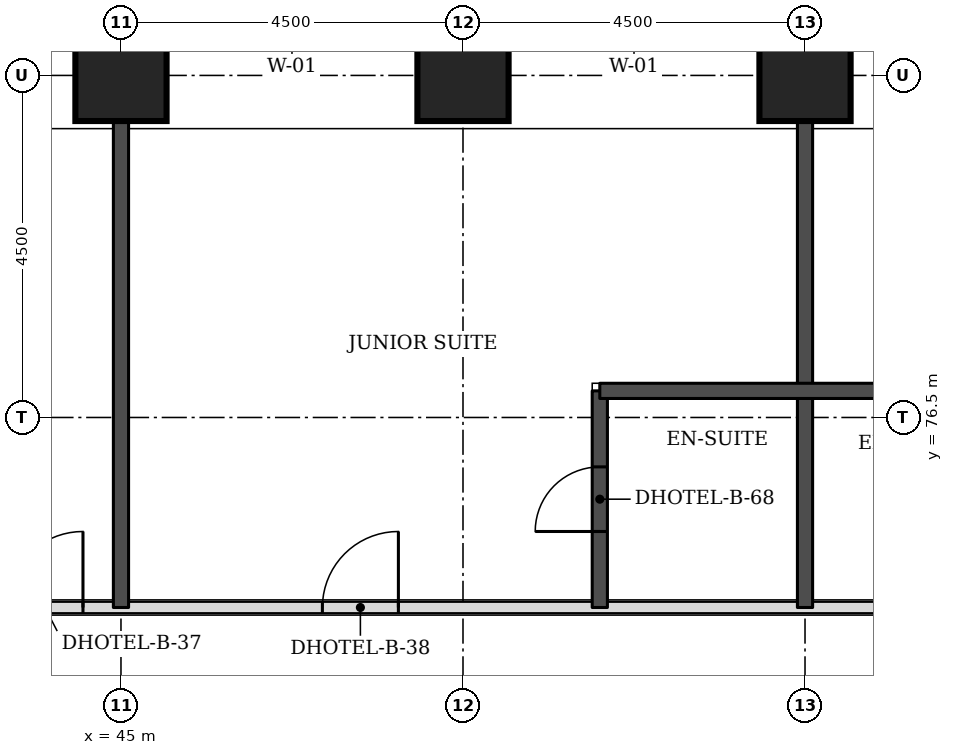
"""IFC4 building model, lengths in metres.
Left out: names, types, materials, properties, quantities, classifications, styles, units other than length and angle.
Written with IfcOpenShell. Run it as: python <this file> out.ifc"""

import sys

from ifc_helpers import new_model, si_unit, direction, frame, frame_2d, origin, origin_2d, place, context, subcontext, project, spatial, rectangle, extrude, element, fill, save


model = new_model("IFC4")
c1 = context("Model", 3, precision=1e-05, world=origin(), true_north=direction((0.0, 1.0)))
c2 = subcontext(c1, "Body", "Model", "MODEL_VIEW")
j1 = project(units=[si_unit("LENGTHUNIT", "METRE"), si_unit("PLANEANGLEUNIT", "RADIAN")], contexts=[c1])
p1 = place(None, origin())
s1 = spatial("IfcSite", under=j1, at=p1, CompositionType="ELEMENT")
p2 = place(p1, origin())
s2 = spatial("IfcBuilding", under=s1, at=p2, CompositionType="ELEMENT")
p3 = place(p2, frame((0.0, 0.0, 52.8)))
s3 = spatial("IfcBuildingStorey", under=s2, at=p3, CompositionType="ELEMENT", Elevation=52.8)
for number, where, z_axis, x_axis in (
    (1, (45.0, 81.0, 0.0), (0.0, 0.0, 1.0), (1.0, 0.0, 0.0)),
    (2, (49.5, 81.0, 0.0), (0.0, 0.0, 1.0), (1.0, 0.0, 0.0)),
    (3, (54.0, 81.0, 0.0), (0.0, 0.0, 1.0), (1.0, 0.0, 0.0)),
):
    element("IfcColumn", number, at=place(p3, frame(where, z_axis=z_axis, x_axis=x_axis)), inside=s3, PredefinedType="COLUMN", context=c2, shape_type="SweptSolid", body=[
        extrude(rectangle(XDim=1.2, YDim=1.2, at=origin_2d()), origin(), (0.0, 0.0, 1.0), 3.3),
    ])
p4 = place(p3, frame((43.0, 74.0, 0.0), z_axis=(0.0, 0.0, 1.0), x_axis=(1.0, 0.0, 0.0)))
e4 = element("IfcWall", 4, at=p4, inside=s3, PredefinedType="PARTITIONING", context=c2, shape_type="SweptSolid", body=[
    extrude(rectangle(XDim=26.5, YDim=0.15, at=frame_2d((13.25, 0.0))), origin(), (0.0, 0.0, 1.0), 3.08),
])
p5 = place(p4, frame((4.65, 0.0, 0.0)))
e5 = element("IfcOpeningElement", 5, at=p5, cuts=e4, PredefinedType="OPENING", context=c2, shape_type="SweptSolid", body=[
    extrude(rectangle(XDim=1.0, YDim=2.1, at=frame_2d((0.5, 1.05))), frame((0.0, 0.085, 0.0), z_axis=(0.0, -1.0, 0.0), x_axis=(1.0, 0.0, 0.0)), (0.0, 0.0, 1.0), 0.17),
])
p6 = place(p4, frame((16.6, 0.0, 0.0)))
e6 = element("IfcOpeningElement", 6, at=p6, cuts=e4, PredefinedType="OPENING", context=c2, shape_type="SweptSolid", body=[
    extrude(rectangle(XDim=1.0, YDim=2.1, at=frame_2d((0.5, 1.05))), frame((0.0, 0.085, 0.0), z_axis=(0.0, -1.0, 0.0), x_axis=(1.0, 0.0, 0.0)), (0.0, 0.0, 1.0), 0.17),
])
p7 = place(p4, frame((20.7, 0.0, 0.0)))
e7 = element("IfcOpeningElement", 7, at=p7, cuts=e4, PredefinedType="OPENING", context=c2, shape_type="SweptSolid", body=[
    extrude(rectangle(XDim=1.0, YDim=2.1, at=frame_2d((0.5, 1.05))), frame((0.0, 0.085, 0.0), z_axis=(0.0, -1.0, 0.0), x_axis=(1.0, 0.0, 0.0)), (0.0, 0.0, 1.0), 0.17),
])
p8 = place(p4, frame((0.5, 0.0, 0.0)))
e8 = element("IfcOpeningElement", 8, at=p8, cuts=e4, PredefinedType="OPENING", context=c2, shape_type="SweptSolid", body=[
    extrude(rectangle(XDim=1.0, YDim=2.1, at=frame_2d((0.5, 1.05))), frame((0.0, 0.085, 0.0), z_axis=(0.0, -1.0, 0.0), x_axis=(1.0, 0.0, 0.0)), (0.0, 0.0, 1.0), 0.17),
])
p9 = place(p4, frame((25.0, 0.0, 0.0)))
e9 = element("IfcOpeningElement", 9, at=p9, cuts=e4, PredefinedType="OPENING", context=c2, shape_type="SweptSolid", body=[
    extrude(rectangle(XDim=1.0, YDim=2.1, at=frame_2d((0.5, 1.05))), frame((0.0, 0.085, 0.0), z_axis=(0.0, -1.0, 0.0), x_axis=(1.0, 0.0, 0.0)), (0.0, 0.0, 1.0), 0.17),
])
p10 = place(p3, frame((45.0, 74.0, 0.0), z_axis=(0.0, 0.0, 1.0), x_axis=(0.0, 1.0, 0.0)))
e10 = element("IfcWall", 10, at=p10, inside=s3, PredefinedType="SOLIDWALL", context=c2, shape_type="SweptSolid", body=[
    extrude(rectangle(XDim=6.4, YDim=0.2, at=frame_2d((3.2, 0.0))), origin(), (0.0, 0.0, 1.0), 3.08),
])
p11 = place(p3, frame((51.3, 74.0, 0.0), z_axis=(0.0, 0.0, 1.0), x_axis=(0.0, 1.0, 0.0)))
e11 = element("IfcWall", 11, at=p11, inside=s3, PredefinedType="SOLIDWALL", context=c2, shape_type="SweptSolid", body=[
    extrude(rectangle(XDim=2.85, YDim=0.2, at=frame_2d((1.425, 0.0))), origin(), (0.0, 0.0, 1.0), 3.08),
])
p12 = place(p11, frame((1.0, 0.0, 0.0)))
e12 = element("IfcOpeningElement", 12, at=p12, cuts=e11, PredefinedType="OPENING", context=c2, shape_type="SweptSolid", body=[
    extrude(rectangle(XDim=0.85, YDim=2.1, at=frame_2d((0.425, 1.05))), frame((0.0, 0.11, 0.0), z_axis=(0.0, -1.0, 0.0), x_axis=(1.0, 0.0, 0.0)), (0.0, 0.0, 1.0), 0.22),
])
p13 = place(p3, frame((54.0, 74.0, 0.0), z_axis=(0.0, 0.0, 1.0), x_axis=(0.0, 1.0, 0.0)))
e13 = element("IfcWall", 13, at=p13, inside=s3, PredefinedType="SOLIDWALL", context=c2, shape_type="SweptSolid", body=[
    extrude(rectangle(XDim=6.4, YDim=0.2, at=frame_2d((3.2, 0.0))), origin(), (0.0, 0.0, 1.0), 3.08),
])
p14 = place(p3, frame((51.3, 76.85, 0.0), z_axis=(0.0, 0.0, 1.0), x_axis=(1.0, 0.0, 0.0)))
e14 = element("IfcWall", 14, at=p14, inside=s3, PredefinedType="SOLIDWALL", context=c2, shape_type="SweptSolid", body=[
    extrude(rectangle(XDim=5.9, YDim=0.2, at=frame_2d((2.95, 0.0))), origin(), (0.0, 0.0, 1.0), 3.08),
])
p15 = place(p5, origin())
e15 = element("IfcDoor", 15, at=p15, inside=s3, OperationType="SINGLE_SWING_RIGHT", PredefinedType="DOOR", context=c2, shape_type="SweptSolid", body=[
    extrude(rectangle(XDim=1.0, YDim=2.1, at=frame_2d((0.5, 1.05))), frame((0.0, 0.025, 0.0), z_axis=(0.0, -1.0, 0.0), x_axis=(1.0, 0.0, 0.0)), (0.0, 0.0, 1.0), 0.05),
])
fill(e5, e15)
p16 = place(p12, origin())
e16 = element("IfcDoor", 16, at=p16, inside=s3, OperationType="SINGLE_SWING_LEFT", PredefinedType="DOOR", context=c2, shape_type="SweptSolid", body=[
    extrude(rectangle(XDim=0.85, YDim=2.1, at=frame_2d((0.425, 1.05))), frame((0.0, 0.025, 0.0), z_axis=(0.0, -1.0, 0.0), x_axis=(1.0, 0.0, 0.0)), (0.0, 0.0, 1.0), 0.05),
])
fill(e12, e16)
p17 = place(p8, origin())
e17 = element("IfcDoor", 17, at=p17, inside=s3, OperationType="SINGLE_SWING_RIGHT", PredefinedType="DOOR", context=c2, shape_type="SweptSolid", body=[
    extrude(rectangle(XDim=1.0, YDim=2.1, at=frame_2d((0.5, 1.05))), frame((0.0, 0.025, 0.0), z_axis=(0.0, -1.0, 0.0), x_axis=(1.0, 0.0, 0.0)), (0.0, 0.0, 1.0), 0.05),
])
fill(e8, e17)
save(model, sys.argv[1])
